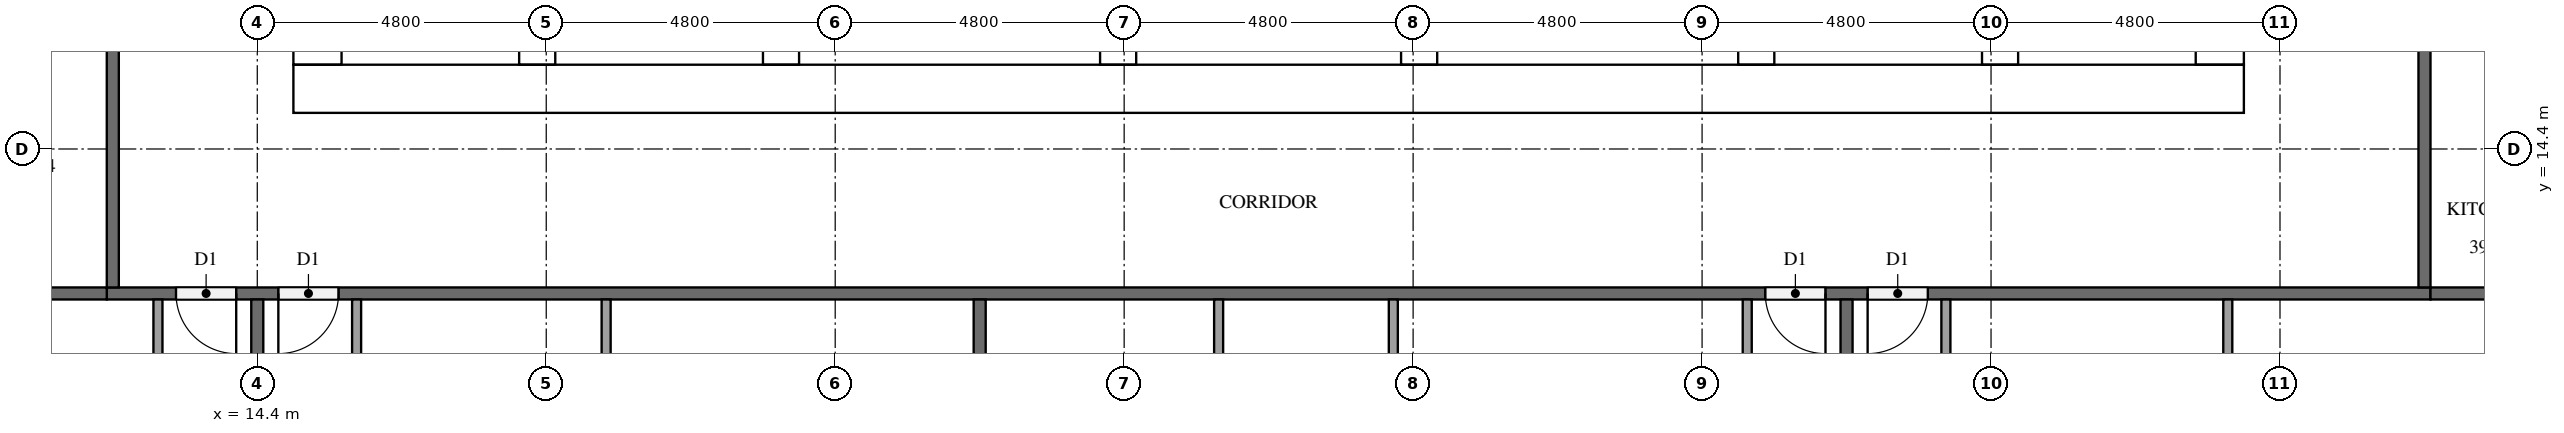
"""IFC4 building model, lengths in metres.
Left out: names, types, materials, properties, quantities, classifications, styles, units other than length and angle.
Written with IfcOpenShell. Run it as: python <this file> out.ifc"""

import sys

from ifc_helpers import new_model, si_unit, direction, frame, frame_2d, origin, place, context, subcontext, project, spatial, rectangle, extrude, element, fill, save


model = new_model("IFC4")
c1 = context("Model", 3, precision=1e-05, world=origin(), true_north=direction((0.0, 1.0)))
c2 = subcontext(c1, "Body", "Model", "MODEL_VIEW")
j1 = project(units=[si_unit("LENGTHUNIT", "METRE"), si_unit("PLANEANGLEUNIT", "RADIAN")], contexts=[c1])
p1 = place(None, origin())
s1 = spatial("IfcSite", under=j1, at=p1, CompositionType="ELEMENT")
p2 = place(p1, origin())
s2 = spatial("IfcBuilding", under=s1, at=p2, CompositionType="ELEMENT")
p3 = place(p2, frame((0.0, 0.0, 152.5)))
s3 = spatial("IfcBuildingStorey", under=s2, at=p3, CompositionType="ELEMENT", Elevation=152.5)
p4 = place(p3, frame((15.0, 15.4, 0.0), z_axis=(0.0, 0.0, 1.0), x_axis=(1.0, 0.0, 0.0)))
e1 = element("IfcWall", 1, at=p4, inside=s3, PredefinedType="SHEAR", context=c2, shape_type="SweptSolid", body=[
    extrude(rectangle(XDim=32.4, YDim=0.8, at=frame_2d((16.2, 0.0))), origin(), (0.0, 0.0, 1.0), 3.2),
])
p5 = place(p4, frame((15.3, 0.0, 0.0)))
e2 = element("IfcOpeningElement", 2, at=p5, cuts=e1, PredefinedType="OPENING", context=c2, shape_type="SweptSolid", body=[
    extrude(rectangle(XDim=1.8, YDim=2.1, at=frame_2d((0.9, 1.05))), frame((0.0, 0.41, 0.0), z_axis=(0.0, -1.0, 0.0), x_axis=(1.0, 0.0, 0.0)), (0.0, 0.0, 1.0), 0.82),
])
p6 = place(p3, frame((15.4, 15.8, 0.0), z_axis=(0.0, 0.0, 1.0), x_axis=(0.0, 1.0, 0.0)))
e3 = element("IfcWall", 3, at=p6, inside=s3, PredefinedType="SHEAR", context=c2, shape_type="SweptSolid", body=[
    extrude(rectangle(XDim=21.2, YDim=0.8, at=frame_2d((10.6, 0.0))), origin(), (0.0, 0.0, 1.0), 3.2),
])
p7 = place(p6, frame((4.96, 0.0, 0.0)))
e4 = element("IfcOpeningElement", 4, at=p7, cuts=e3, PredefinedType="OPENING", context=c2, shape_type="SweptSolid", body=[
    extrude(rectangle(XDim=1.2, YDim=2.1, at=frame_2d((0.6, 1.05))), frame((0.0, 0.41, 0.0), z_axis=(0.0, -1.0, 0.0), x_axis=(1.0, 0.0, 0.0)), (0.0, 0.0, 1.0), 0.82),
])
p8 = place(p3, frame((47.0, 15.8, 0.0), z_axis=(0.0, 0.0, 1.0), x_axis=(0.0, 1.0, 0.0)))
e5 = element("IfcWall", 5, at=p8, inside=s3, PredefinedType="SHEAR", context=c2, shape_type="SweptSolid", body=[
    extrude(rectangle(XDim=21.2, YDim=0.8, at=frame_2d((10.6, 0.0))), origin(), (0.0, 0.0, 1.0), 3.2),
])
p9 = place(p8, frame((10.3, 0.0, 0.0)))
e6 = element("IfcOpeningElement", 6, at=p9, cuts=e5, PredefinedType="OPENING", context=c2, shape_type="SweptSolid", body=[
    extrude(rectangle(XDim=1.2, YDim=2.1, at=frame_2d((0.6, 1.05))), frame((0.0, 0.41, 0.0), z_axis=(0.0, -1.0, 0.0), x_axis=(1.0, 0.0, 0.0)), (0.0, 0.0, 1.0), 0.82),
])
p10 = place(p3, frame((19.05, 15.8, 0.0), z_axis=(0.0, 0.0, 1.0), x_axis=(0.0, 1.0, 0.0)))
e7 = element("IfcWall", 7, at=p10, inside=s3, PredefinedType="SHEAR", context=c2, shape_type="SweptSolid", body=[
    extrude(rectangle(XDim=15.15, YDim=0.6, at=frame_2d((7.575, 0.0))), origin(), (0.0, 0.0, 1.0), 3.2),
])
p11 = place(p10, frame((9.65, 0.0, 0.0)))
e8 = element("IfcOpeningElement", 8, at=p11, cuts=e7, PredefinedType="OPENING", context=c2, shape_type="SweptSolid", body=[
    extrude(rectangle(XDim=1.1, YDim=2.1, at=frame_2d((0.55, 1.05))), frame((0.0, 0.31, 0.0), z_axis=(0.0, -1.0, 0.0), x_axis=(1.0, 0.0, 0.0)), (0.0, 0.0, 1.0), 0.62),
])
p12 = place(p10, frame((13.15, 0.0, 0.0)))
e9 = element("IfcOpeningElement", 9, at=p12, cuts=e7, PredefinedType="OPENING", context=c2, shape_type="SweptSolid", body=[
    extrude(rectangle(XDim=1.1, YDim=2.1, at=frame_2d((0.55, 1.05))), frame((0.0, 0.31, 0.0), z_axis=(0.0, -1.0, 0.0), x_axis=(1.0, 0.0, 0.0)), (0.0, 0.0, 1.0), 0.62),
])
p13 = place(p10, frame((0.4, 0.0, 0.0)))
e10 = element("IfcOpeningElement", 10, at=p13, cuts=e7, PredefinedType="OPENING", context=c2, shape_type="SweptSolid", body=[
    extrude(rectangle(XDim=1.2, YDim=2.1, at=frame_2d((0.6, 1.05))), frame((0.0, 0.31, 0.0), z_axis=(0.0, -1.0, 0.0), x_axis=(1.0, 0.0, 0.0)), (0.0, 0.0, 1.0), 0.62),
])
p14 = place(p3, frame((23.1, 15.8, 0.0), z_axis=(0.0, 0.0, 1.0), x_axis=(0.0, 1.0, 0.0)))
e11 = element("IfcWall", 11, at=p14, inside=s3, PredefinedType="SHEAR", context=c2, shape_type="SweptSolid", body=[
    extrude(rectangle(XDim=21.2, YDim=0.6, at=frame_2d((10.6, 0.0))), origin(), (0.0, 0.0, 1.0), 3.2),
])
p15 = place(p3, frame((39.3, 15.8, 0.0), z_axis=(0.0, 0.0, 1.0), x_axis=(0.0, 1.0, 0.0)))
e12 = element("IfcWall", 12, at=p15, inside=s3, PredefinedType="SHEAR", context=c2, shape_type="SweptSolid", body=[
    extrude(rectangle(XDim=8.45, YDim=0.6, at=frame_2d((4.225, 0.0))), origin(), (0.0, 0.0, 1.0), 3.2),
])
p16 = place(p3, frame((43.35, 15.8, 0.0), z_axis=(0.0, 0.0, 1.0), x_axis=(0.0, 1.0, 0.0)))
e13 = element("IfcWall", 13, at=p16, inside=s3, PredefinedType="SHEAR", context=c2, shape_type="SweptSolid", body=[
    extrude(rectangle(XDim=8.45, YDim=0.6, at=frame_2d((4.225, 0.0))), origin(), (0.0, 0.0, 1.0), 3.2),
])
p17 = place(p16, frame((0.4, 0.0, 0.0)))
e14 = element("IfcOpeningElement", 14, at=p17, cuts=e13, PredefinedType="OPENING", context=c2, shape_type="SweptSolid", body=[
    extrude(rectangle(XDim=1.2, YDim=2.1, at=frame_2d((0.6, 1.05))), frame((0.0, 0.31, 0.0), z_axis=(0.0, -1.0, 0.0), x_axis=(1.0, 0.0, 0.0)), (0.0, 0.0, 1.0), 0.62),
])
for number, where, z_axis, x_axis in (
    (15, (28.7, 15.8, 0.0), (0.0, 0.0, 1.0), (0.0, 1.0, 0.0)),
    (16, (33.7, 15.8, 0.0), (0.0, 0.0, 1.0), (0.0, 1.0, 0.0)),
):
    element("IfcWall", number, at=place(p3, frame(where, z_axis=z_axis, x_axis=x_axis)), inside=s3, PredefinedType="SHEAR", context=c2, shape_type="SweptSolid", body=[
        extrude(rectangle(XDim=2.65, YDim=0.6, at=frame_2d((1.325, 0.0))), origin(), (0.0, 0.0, 1.0), 3.2),
    ])
p18 = place(p3, frame((50.5, 12.0, 0.0), z_axis=(0.0, 0.0, 1.0), x_axis=(-1.0, 0.0, 0.0)))
e17 = element("IfcWall", 17, at=p18, inside=s3, PredefinedType="PARTITIONING", context=c2, shape_type="SweptSolid", body=[
    extrude(rectangle(XDim=38.6, YDim=0.2, at=frame_2d((19.3, 0.0))), origin(), (0.0, 0.0, 1.0), 3.2),
])
p19 = place(p18, frame((36.45, 0.0, 0.0)))
e18 = element("IfcOpeningElement", 18, at=p19, cuts=e17, PredefinedType="OPENING", context=c2, shape_type="SweptSolid", body=[
    extrude(rectangle(XDim=1.0, YDim=2.1, at=frame_2d((0.5, 1.05))), frame((0.0, 0.11, 0.0), z_axis=(0.0, -1.0, 0.0), x_axis=(1.0, 0.0, 0.0)), (0.0, 0.0, 1.0), 0.22),
])
p20 = place(p18, frame((34.75, 0.0, 0.0)))
e19 = element("IfcOpeningElement", 19, at=p20, cuts=e17, PredefinedType="OPENING", context=c2, shape_type="SweptSolid", body=[
    extrude(rectangle(XDim=1.0, YDim=2.1, at=frame_2d((0.5, 1.05))), frame((0.0, 0.11, 0.0), z_axis=(0.0, -1.0, 0.0), x_axis=(1.0, 0.0, 0.0)), (0.0, 0.0, 1.0), 0.22),
])
p21 = place(p18, frame((10.05, 0.0, 0.0)))
e20 = element("IfcOpeningElement", 20, at=p21, cuts=e17, PredefinedType="OPENING", context=c2, shape_type="SweptSolid", body=[
    extrude(rectangle(XDim=1.0, YDim=2.1, at=frame_2d((0.5, 1.05))), frame((0.0, 0.11, 0.0), z_axis=(0.0, -1.0, 0.0), x_axis=(1.0, 0.0, 0.0)), (0.0, 0.0, 1.0), 0.22),
])
p22 = place(p18, frame((8.35, 0.0, 0.0)))
e21 = element("IfcOpeningElement", 21, at=p22, cuts=e17, PredefinedType="OPENING", context=c2, shape_type="SweptSolid", body=[
    extrude(rectangle(XDim=1.0, YDim=2.1, at=frame_2d((0.5, 1.05))), frame((0.0, 0.11, 0.0), z_axis=(0.0, -1.0, 0.0), x_axis=(1.0, 0.0, 0.0)), (0.0, 0.0, 1.0), 0.22),
])
p23 = place(p3, frame((50.4, 40.7, 0.0), z_axis=(0.0, 0.0, 1.0), x_axis=(0.0, -1.0, 0.0)))
e22 = element("IfcWall", 22, at=p23, inside=s3, PredefinedType="PARTITIONING", context=c2, shape_type="SweptSolid", body=[
    extrude(rectangle(XDim=28.6, YDim=0.2, at=frame_2d((14.3, 0.0))), origin(), (0.0, 0.0, 1.0), 3.2),
])
p24 = place(p23, frame((17.05, 0.0, 0.0)))
e23 = element("IfcOpeningElement", 23, at=p24, cuts=e22, PredefinedType="OPENING", context=c2, shape_type="SweptSolid", body=[
    extrude(rectangle(XDim=1.0, YDim=2.1, at=frame_2d((0.5, 1.05))), frame((0.0, 0.11, 0.0), z_axis=(0.0, -1.0, 0.0), x_axis=(1.0, 0.0, 0.0)), (0.0, 0.0, 1.0), 0.22),
])
p25 = place(p23, frame((15.35, 0.0, 0.0)))
e24 = element("IfcOpeningElement", 24, at=p25, cuts=e22, PredefinedType="OPENING", context=c2, shape_type="SweptSolid", body=[
    extrude(rectangle(XDim=1.0, YDim=2.1, at=frame_2d((0.5, 1.05))), frame((0.0, 0.11, 0.0), z_axis=(0.0, -1.0, 0.0), x_axis=(1.0, 0.0, 0.0)), (0.0, 0.0, 1.0), 0.22),
])
p26 = place(p23, frame((5.75, 0.0, 0.0)))
e25 = element("IfcOpeningElement", 25, at=p26, cuts=e22, PredefinedType="OPENING", context=c2, shape_type="SweptSolid", body=[
    extrude(rectangle(XDim=1.0, YDim=2.1, at=frame_2d((0.5, 1.05))), frame((0.0, 0.11, 0.0), z_axis=(0.0, -1.0, 0.0), x_axis=(1.0, 0.0, 0.0)), (0.0, 0.0, 1.0), 0.22),
])
p27 = place(p3, frame((12.0, 12.1, 0.0), z_axis=(0.0, 0.0, 1.0), x_axis=(0.0, 1.0, 0.0)))
e26 = element("IfcWall", 26, at=p27, inside=s3, PredefinedType="PARTITIONING", context=c2, shape_type="SweptSolid", body=[
    extrude(rectangle(XDim=28.6, YDim=0.2, at=frame_2d((14.3, 0.0))), origin(), (0.0, 0.0, 1.0), 3.2),
])
p28 = place(p27, frame((27.35, 0.0, 0.0)))
e27 = element("IfcOpeningElement", 27, at=p28, cuts=e26, PredefinedType="OPENING", context=c2, shape_type="SweptSolid", body=[
    extrude(rectangle(XDim=1.0, YDim=2.1, at=frame_2d((0.5, 1.05))), frame((0.0, 0.11, 0.0), z_axis=(0.0, -1.0, 0.0), x_axis=(1.0, 0.0, 0.0)), (0.0, 0.0, 1.0), 0.22),
])
p29 = place(p27, frame((20.15, 0.0, 0.0)))
e28 = element("IfcOpeningElement", 28, at=p29, cuts=e26, PredefinedType="OPENING", context=c2, shape_type="SweptSolid", body=[
    extrude(rectangle(XDim=1.0, YDim=2.1, at=frame_2d((0.5, 1.05))), frame((0.0, 0.11, 0.0), z_axis=(0.0, -1.0, 0.0), x_axis=(1.0, 0.0, 0.0)), (0.0, 0.0, 1.0), 0.22),
])
p30 = place(p27, frame((10.55, 0.0, 0.0)))
e29 = element("IfcOpeningElement", 29, at=p30, cuts=e26, PredefinedType="OPENING", context=c2, shape_type="SweptSolid", body=[
    extrude(rectangle(XDim=1.0, YDim=2.1, at=frame_2d((0.5, 1.05))), frame((0.0, 0.11, 0.0), z_axis=(0.0, -1.0, 0.0), x_axis=(1.0, 0.0, 0.0)), (0.0, 0.0, 1.0), 0.22),
])
p31 = place(p3, frame((14.4, 11.9, 0.0), z_axis=(0.0, 0.0, 1.0), x_axis=(0.0, -1.0, 0.0)))
e30 = element("IfcWall", 30, at=p31, inside=s3, PredefinedType="PARTITIONING", context=c2, shape_type="SweptSolid", body=[
    extrude(rectangle(XDim=11.525, YDim=0.2, at=frame_2d((5.762, 0.0))), origin(), (0.0, 0.0, 1.0), 3.2),
])
for number, where, z_axis, x_axis in (
    (31, (0.1, 12.0, 0.0), (0.0, 0.0, 1.0), (1.0, 0.0, 0.0)),
    (32, (26.4, 11.9, 0.0), (0.0, 0.0, 1.0), (0.0, -1.0, 0.0)),
    (33, (40.8, 11.9, 0.0), (0.0, 0.0, 1.0), (0.0, -1.0, 0.0)),
):
    element("IfcWall", number, at=place(p3, frame(where, z_axis=z_axis, x_axis=x_axis)), inside=s3, PredefinedType="PARTITIONING", context=c2, shape_type="SweptSolid", body=[
        extrude(rectangle(XDim=11.8, YDim=0.2, at=frame_2d((5.9, 0.0))), origin(), (0.0, 0.0, 1.0), 3.2),
    ])
p32 = place(p3, frame((50.5, 12.0, 0.0), z_axis=(0.0, 0.0, 1.0), x_axis=(1.0, 0.0, 0.0)))
e34 = element("IfcWall", 34, at=p32, inside=s3, PredefinedType="PARTITIONING", context=c2, shape_type="SweptSolid", body=[
    extrude(rectangle(XDim=7.0, YDim=0.2, at=frame_2d((3.5, 0.0))), origin(), (0.0, 0.0, 1.0), 3.2),
])
p33 = place(p3, frame((12.75, 11.9, 0.0), z_axis=(0.0, 0.0, 1.0), x_axis=(0.0, -1.0, 0.0)))
e35 = element("IfcWall", 35, at=p33, inside=s3, PredefinedType="PARTITIONING", context=c2, shape_type="SweptSolid", body=[
    extrude(rectangle(XDim=3.125, YDim=0.15, at=frame_2d((1.562, 0.0))), origin(), (0.0, 0.0, 1.0), 3.2),
])
p34 = place(p3, frame((20.195, 11.9, 0.0), z_axis=(0.0, 0.0, 1.0), x_axis=(0.0, -1.0, 0.0)))
e36 = element("IfcWall", 36, at=p34, inside=s3, PredefinedType="PARTITIONING", context=c2, shape_type="SweptSolid", body=[
    extrude(rectangle(XDim=2.975, YDim=0.15, at=frame_2d((1.487, 0.0))), origin(), (0.0, 0.0, 1.0), 3.2),
])
p35 = place(p3, frame((16.05, 11.9, 0.0), z_axis=(0.0, 0.0, 1.0), x_axis=(0.0, -1.0, 0.0)))
e37 = element("IfcWall", 37, at=p35, inside=s3, PredefinedType="PARTITIONING", context=c2, shape_type="SweptSolid", body=[
    extrude(rectangle(XDim=3.125, YDim=0.15, at=frame_2d((1.562, 0.0))), origin(), (0.0, 0.0, 1.0), 3.2),
])
for number, where, z_axis, x_axis in (
    (38, (33.271, 11.9, 0.0), (0.0, 0.0, 1.0), (0.0, -1.0, 0.0)),
    (39, (30.369, 11.9, 0.0), (0.0, 0.0, 1.0), (0.0, -1.0, 0.0)),
):
    element("IfcWall", number, at=place(p3, frame(where, z_axis=z_axis, x_axis=x_axis)), inside=s3, PredefinedType="PARTITIONING", context=c2, shape_type="SweptSolid", body=[
        extrude(rectangle(XDim=3.875, YDim=0.15, at=frame_2d((1.938, 0.0))), origin(), (0.0, 0.0, 1.0), 3.2),
    ])
p36 = place(p3, frame((39.15, 11.9, 0.0), z_axis=(0.0, 0.0, 1.0), x_axis=(0.0, -1.0, 0.0)))
e40 = element("IfcWall", 40, at=p36, inside=s3, PredefinedType="PARTITIONING", context=c2, shape_type="SweptSolid", body=[
    extrude(rectangle(XDim=4.025, YDim=0.15, at=frame_2d((2.012, 0.0))), origin(), (0.0, 0.0, 1.0), 3.2),
])
p37 = place(p3, frame((47.133, 11.9, 0.0), z_axis=(0.0, 0.0, 1.0), x_axis=(0.0, -1.0, 0.0)))
e41 = element("IfcWall", 41, at=p37, inside=s3, PredefinedType="PARTITIONING", context=c2, shape_type="SweptSolid", body=[
    extrude(rectangle(XDim=4.175, YDim=0.15, at=frame_2d((2.087, 0.0))), origin(), (0.0, 0.0, 1.0), 3.2),
])
p38 = place(p3, frame((42.45, 11.9, 0.0), z_axis=(0.0, 0.0, 1.0), x_axis=(0.0, -1.0, 0.0)))
e42 = element("IfcWall", 42, at=p38, inside=s3, PredefinedType="PARTITIONING", context=c2, shape_type="SweptSolid", body=[
    extrude(rectangle(XDim=4.325, YDim=0.15, at=frame_2d((2.163, 0.0))), origin(), (0.0, 0.0, 1.0), 3.2),
])
p39 = place(p5, frame((1.8, 0.0, 0.0), z_axis=(0.0, 0.0, 1.0), x_axis=(-1.0, 0.0, 0.0)))
e43 = element("IfcDoor", 43, at=p39, inside=s3, OperationType="DOUBLE_DOOR_SINGLE_SWING", PredefinedType="DOOR", context=c2, shape_type="SweptSolid", body=[
    extrude(rectangle(XDim=1.8, YDim=2.1, at=frame_2d((0.9, 1.05))), frame((0.0, 0.025, 0.0), z_axis=(0.0, -1.0, 0.0), x_axis=(1.0, 0.0, 0.0)), (0.0, 0.0, 1.0), 0.05),
])
fill(e2, e43)
p40 = place(p19, origin())
e44 = element("IfcDoor", 44, at=p40, inside=s3, OperationType="SINGLE_SWING_LEFT", PredefinedType="DOOR", context=c2, shape_type="SweptSolid", body=[
    extrude(rectangle(XDim=1.0, YDim=2.1, at=frame_2d((0.5, 1.05))), frame((0.0, 0.025, 0.0), z_axis=(0.0, -1.0, 0.0), x_axis=(1.0, 0.0, 0.0)), (0.0, 0.0, 1.0), 0.05),
])
fill(e18, e44)
p41 = place(p20, origin())
e45 = element("IfcDoor", 45, at=p41, inside=s3, OperationType="SINGLE_SWING_RIGHT", PredefinedType="DOOR", context=c2, shape_type="SweptSolid", body=[
    extrude(rectangle(XDim=1.0, YDim=2.1, at=frame_2d((0.5, 1.05))), frame((0.0, 0.025, 0.0), z_axis=(0.0, -1.0, 0.0), x_axis=(1.0, 0.0, 0.0)), (0.0, 0.0, 1.0), 0.05),
])
fill(e19, e45)
p42 = place(p21, origin())
e46 = element("IfcDoor", 46, at=p42, inside=s3, OperationType="SINGLE_SWING_LEFT", PredefinedType="DOOR", context=c2, shape_type="SweptSolid", body=[
    extrude(rectangle(XDim=1.0, YDim=2.1, at=frame_2d((0.5, 1.05))), frame((0.0, 0.025, 0.0), z_axis=(0.0, -1.0, 0.0), x_axis=(1.0, 0.0, 0.0)), (0.0, 0.0, 1.0), 0.05),
])
fill(e20, e46)
p43 = place(p22, origin())
e47 = element("IfcDoor", 47, at=p43, inside=s3, OperationType="SINGLE_SWING_RIGHT", PredefinedType="DOOR", context=c2, shape_type="SweptSolid", body=[
    extrude(rectangle(XDim=1.0, YDim=2.1, at=frame_2d((0.5, 1.05))), frame((0.0, 0.025, 0.0), z_axis=(0.0, -1.0, 0.0), x_axis=(1.0, 0.0, 0.0)), (0.0, 0.0, 1.0), 0.05),
])
fill(e21, e47)
save(model, sys.argv[1])
